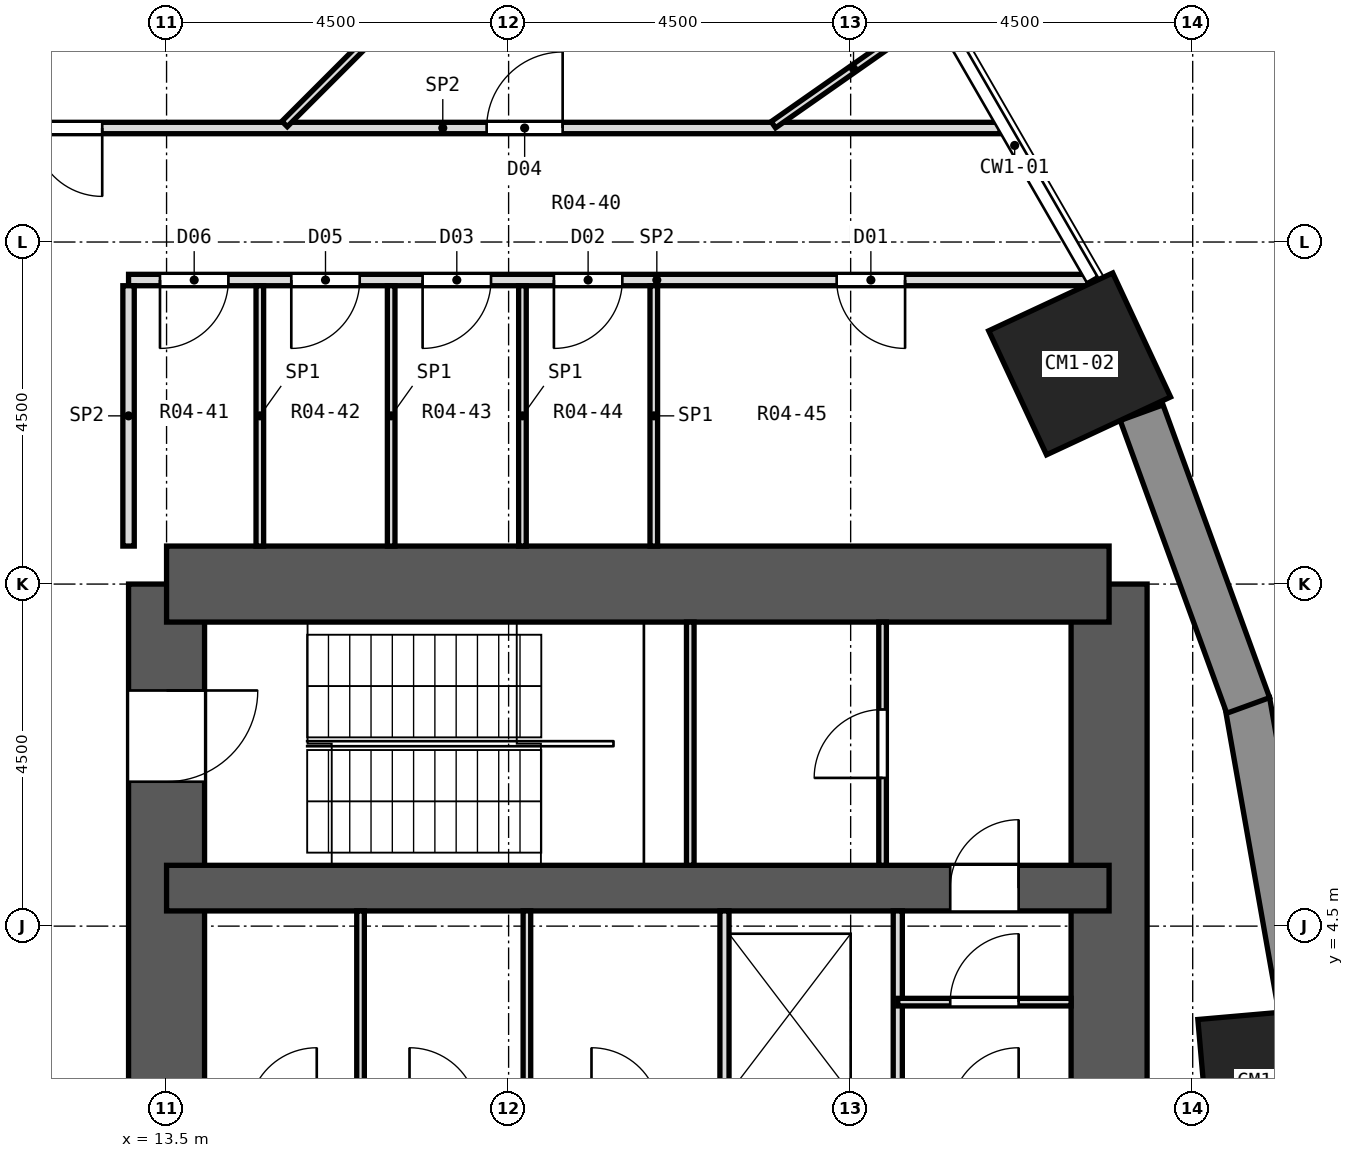
"""IFC4 building model, lengths in metres.
Left out: names, types, materials, properties, quantities, classifications, styles, units other than length and angle.
Written with IfcOpenShell. Run it as: python <this file> out.ifc"""

import sys

from ifc_helpers import new_model, si_unit, direction, frame, frame_2d, origin, origin_2d, place, context, subcontext, project, spatial, rectangle, extrude, element, fill, save


model = new_model("IFC4")
c1 = context("Model", 3, precision=1e-05, world=origin(), true_north=direction((0.0, 1.0)))
c2 = subcontext(c1, "Body", "Model", "MODEL_VIEW")
j1 = project(units=[si_unit("LENGTHUNIT", "METRE"), si_unit("PLANEANGLEUNIT", "RADIAN")], contexts=[c1])
p1 = place(None, origin())
s1 = spatial("IfcSite", under=j1, at=p1, CompositionType="ELEMENT")
p2 = place(p1, origin())
s2 = spatial("IfcBuilding", under=s1, at=p2, CompositionType="ELEMENT")
p3 = place(p2, frame((0.0, 0.0, 5.0)))
s3 = spatial("IfcBuildingStorey", under=s2, at=p3, CompositionType="ELEMENT", Elevation=5.0)
for number, where, z_axis, x_axis in (
    (1, (28.043, 2.453, 0.0), (0.0, 0.0, 1.0), (0.996, 0.087, 0.0)),
    (2, (25.512, 11.897, 0.0), (0.0, 0.0, 1.0), (0.906, 0.423, 0.0)),
):
    element("IfcColumn", number, at=place(p3, frame(where, z_axis=z_axis, x_axis=x_axis)), inside=s3, PredefinedType="COLUMN", context=c2, shape_type="SweptSolid", body=[
        extrude(rectangle(XDim=1.8, YDim=1.8, at=origin_2d()), origin(), (0.0, 0.0, 1.0), 4.2),
    ])
p4 = place(p3, frame((13.5, -9.0, 0.0), z_axis=(0.0, 0.0, 1.0), x_axis=(0.0, 1.0, 0.0)))
e3 = element("IfcWall", 3, at=p4, inside=s3, PredefinedType="SHEAR", context=c2, shape_type="SweptSolid", body=[
    extrude(rectangle(XDim=18.0, YDim=1.0, at=frame_2d((9.0, 0.0))), origin(), (0.0, 0.0, 1.0), 4.2),
])
p5 = place(p4, frame((15.4, 0.0, 0.0)))
e4 = element("IfcOpeningElement", 4, at=p5, cuts=e3, PredefinedType="OPENING", context=c2, shape_type="SweptSolid", body=[
    extrude(rectangle(XDim=1.2, YDim=2.1, at=frame_2d((0.6, 1.05))), frame((0.0, 0.512, 0.0), z_axis=(0.0, -1.0, 0.0), x_axis=(1.0, 0.0, 0.0)), (0.0, 0.0, 1.0), 1.024),
])
p6 = place(p4, frame((1.4, 0.0, 0.0)))
e5 = element("IfcOpeningElement", 5, at=p6, cuts=e3, PredefinedType="OPENING", context=c2, shape_type="SweptSolid", body=[
    extrude(rectangle(XDim=1.2, YDim=2.1, at=frame_2d((0.6, 1.05))), frame((0.0, 0.512, 0.0), z_axis=(0.0, -1.0, 0.0), x_axis=(1.0, 0.0, 0.0)), (0.0, 0.0, 1.0), 1.024),
])
p7 = place(p4, frame((7.5, 0.0, 0.0)))
e6 = element("IfcOpeningElement", 6, at=p7, cuts=e3, PredefinedType="OPENING", context=c2, shape_type="SweptSolid", body=[
    extrude(rectangle(XDim=3.0, YDim=2.4, at=frame_2d((1.5, 1.2))), frame((0.0, 0.512, 0.0), z_axis=(0.0, -1.0, 0.0), x_axis=(1.0, 0.0, 0.0)), (0.0, 0.0, 1.0), 1.024),
])
p8 = place(p3, frame((25.9, -9.0, 0.0), z_axis=(0.0, 0.0, 1.0), x_axis=(0.0, 1.0, 0.0)))
e7 = element("IfcWall", 7, at=p8, inside=s3, PredefinedType="SHEAR", context=c2, shape_type="SweptSolid", body=[
    extrude(rectangle(XDim=18.0, YDim=1.0, at=frame_2d((9.0, 0.0))), origin(), (0.0, 0.0, 1.0), 4.2),
])
p9 = place(p3, frame((13.5, 9.0, 0.0), z_axis=(0.0, 0.0, 1.0), x_axis=(1.0, 0.0, 0.0)))
e8 = element("IfcWall", 8, at=p9, inside=s3, PredefinedType="SHEAR", context=c2, shape_type="SweptSolid", body=[
    extrude(rectangle(XDim=12.4, YDim=1.0, at=frame_2d((6.2, 0.0))), origin(), (0.0, 0.0, 1.0), 4.2),
])
p10 = place(p3, frame((13.5, 5.0, 0.0), z_axis=(0.0, 0.0, 1.0), x_axis=(1.0, 0.0, 0.0)))
e9 = element("IfcWall", 9, at=p10, inside=s3, PredefinedType="SHEAR", context=c2, shape_type="SweptSolid", body=[
    extrude(rectangle(XDim=12.4, YDim=0.6, at=frame_2d((6.2, 0.0))), origin(), (0.0, 0.0, 1.0), 4.2),
])
p11 = place(p10, frame((10.31, 0.0, 0.0)))
e10 = element("IfcOpeningElement", 10, at=p11, cuts=e9, PredefinedType="OPENING", context=c2, shape_type="SweptSolid", body=[
    extrude(rectangle(XDim=0.9, YDim=2.1, at=frame_2d((0.45, 1.05))), frame((0.0, 0.312, 0.0), z_axis=(0.0, -1.0, 0.0), x_axis=(1.0, 0.0, 0.0)), (0.0, 0.0, 1.0), 0.624),
])
p12 = place(p3, frame((28.428, 3.417, 0.0), z_axis=(0.0, 0.0, 1.0), x_axis=(-0.173673210505, 0.984803338719, 0.0)))
e11 = element("IfcWall", 11, at=p12, inside=s3, PredefinedType="SOLIDWALL", context=c2, shape_type="SweptSolid", body=[
    extrude(rectangle(XDim=4.099, YDim=0.6, at=frame_2d((2.05, 0.0))), origin(), (0.0, 0.0, 1.0), 3.65),
])
p13 = place(p3, frame((27.73, 7.403, 0.0), z_axis=(0.0, 0.0, 1.0), x_axis=(-0.342034744565, 0.939687306241, 0.0)))
e12 = element("IfcWall", 12, at=p13, inside=s3, PredefinedType="SOLIDWALL", context=c2, shape_type="SweptSolid", body=[
    extrude(rectangle(XDim=4.099, YDim=0.6, at=frame_2d((2.05, 0.0))), origin(), (0.0, 0.0, 1.0), 3.65),
])
p14 = place(p3, frame((13.0, 13.0, 0.0), z_axis=(0.0, 0.0, 1.0), x_axis=(1.0, 0.0, 0.0)))
e13 = element("IfcWall", 13, at=p14, inside=s3, PredefinedType="PARTITIONING", context=c2, shape_type="SweptSolid", body=[
    extrude(rectangle(XDim=12.622, YDim=0.15, at=frame_2d((6.311, 0.0))), origin(), (0.0, 0.0, 1.0), 3.65),
])
p15 = place(p14, frame((9.316, 0.0, 0.0)))
e14 = element("IfcOpeningElement", 14, at=p15, cuts=e13, PredefinedType="OPENING", context=c2, shape_type="SweptSolid", body=[
    extrude(rectangle(XDim=0.9, YDim=2.1, at=frame_2d((0.45, 1.05))), frame((0.0, 0.087, 0.0), z_axis=(0.0, -1.0, 0.0), x_axis=(1.0, 0.0, 0.0)), (0.0, 0.0, 1.0), 0.174),
])
p16 = place(p14, frame((5.596, 0.0, 0.0)))
e15 = element("IfcOpeningElement", 15, at=p16, cuts=e13, PredefinedType="OPENING", context=c2, shape_type="SweptSolid", body=[
    extrude(rectangle(XDim=0.9, YDim=2.1, at=frame_2d((0.45, 1.05))), frame((0.0, 0.087, 0.0), z_axis=(0.0, -1.0, 0.0), x_axis=(1.0, 0.0, 0.0)), (0.0, 0.0, 1.0), 0.174),
])
p17 = place(p14, frame((3.868, 0.0, 0.0)))
e16 = element("IfcOpeningElement", 16, at=p17, cuts=e13, PredefinedType="OPENING", context=c2, shape_type="SweptSolid", body=[
    extrude(rectangle(XDim=0.9, YDim=2.1, at=frame_2d((0.45, 1.05))), frame((0.0, 0.087, 0.0), z_axis=(0.0, -1.0, 0.0), x_axis=(1.0, 0.0, 0.0)), (0.0, 0.0, 1.0), 0.174),
])
p18 = place(p14, frame((2.141, 0.0, 0.0)))
e17 = element("IfcOpeningElement", 17, at=p18, cuts=e13, PredefinedType="OPENING", context=c2, shape_type="SweptSolid", body=[
    extrude(rectangle(XDim=0.9, YDim=2.1, at=frame_2d((0.45, 1.05))), frame((0.0, 0.087, 0.0), z_axis=(0.0, -1.0, 0.0), x_axis=(1.0, 0.0, 0.0)), (0.0, 0.0, 1.0), 0.174),
])
p19 = place(p14, frame((0.414, 0.0, 0.0)))
e18 = element("IfcOpeningElement", 18, at=p19, cuts=e13, PredefinedType="OPENING", context=c2, shape_type="SweptSolid", body=[
    extrude(rectangle(XDim=0.9, YDim=2.1, at=frame_2d((0.45, 1.05))), frame((0.0, 0.087, 0.0), z_axis=(0.0, -1.0, 0.0), x_axis=(1.0, 0.0, 0.0)), (0.0, 0.0, 1.0), 0.174),
])
p20 = place(p3, frame((9.8, 15.0, 0.0), z_axis=(0.0, 0.0, 1.0), x_axis=(1.0, 0.0, 0.0)))
e19 = element("IfcWall", 19, at=p20, inside=s3, PredefinedType="PARTITIONING", context=c2, shape_type="SweptSolid", body=[
    extrude(rectangle(XDim=14.668, YDim=0.15, at=frame_2d((7.334, 0.0))), origin(), (0.0, 0.0, 1.0), 3.65),
])
p21 = place(p20, frame((7.911, 0.0, 0.0)))
e20 = element("IfcOpeningElement", 20, at=p21, cuts=e19, PredefinedType="OPENING", context=c2, shape_type="SweptSolid", body=[
    extrude(rectangle(XDim=1.0, YDim=2.1, at=frame_2d((0.5, 1.05))), frame((0.0, 0.087, 0.0), z_axis=(0.0, -1.0, 0.0), x_axis=(1.0, 0.0, 0.0)), (0.0, 0.0, 1.0), 0.174),
])
p22 = place(p20, frame((1.053, 0.0, 0.0)))
e21 = element("IfcOpeningElement", 21, at=p22, cuts=e19, PredefinedType="OPENING", context=c2, shape_type="SweptSolid", body=[
    extrude(rectangle(XDim=1.8, YDim=2.1, at=frame_2d((0.9, 1.05))), frame((0.0, 0.087, 0.0), z_axis=(0.0, -1.0, 0.0), x_axis=(1.0, 0.0, 0.0)), (0.0, 0.0, 1.0), 0.174),
])
p23 = place(p3, frame((21.483, 15.043, 0.0), z_axis=(0.0, 0.0, 1.0), x_axis=(0.819102633098, 0.573646996376, 0.0)))
e22 = element("IfcWall", 22, at=p23, inside=s3, PredefinedType="PARTITIONING", context=c2, shape_type="SweptSolid", body=[
    extrude(rectangle(XDim=2.573, YDim=0.1, at=frame_2d((1.287, 0.0))), origin(), (0.0, 0.0, 1.0), 3.65),
])
p24 = place(p3, frame((15.053, 15.053, 0.0), z_axis=(0.0, 0.0, 1.0), x_axis=(0.707106781187, 0.707106781187, 0.0)))
e23 = element("IfcWall", 23, at=p24, inside=s3, PredefinedType="PARTITIONING", context=c2, shape_type="SweptSolid", body=[
    extrude(rectangle(XDim=5.952, YDim=0.1, at=frame_2d((2.976, 0.0))), origin(), (0.0, 0.0, 1.0), 3.65),
])
p25 = place(p3, frame((10.546, 15.061, 0.0), z_axis=(0.0, 0.0, 1.0), x_axis=(0.573610244327, 0.819128370649, 0.0)))
e24 = element("IfcWall", 24, at=p25, inside=s3, PredefinedType="PARTITIONING", context=c2, shape_type="SweptSolid", body=[
    extrude(rectangle(XDim=10.413, YDim=0.1, at=frame_2d((5.207, 0.0))), origin(), (0.0, 0.0, 1.0), 3.65),
])
p26 = place(p25, frame((4.669, 0.0, 0.0)))
e25 = element("IfcOpeningElement", 25, at=p26, cuts=e24, PredefinedType="OPENING", context=c2, shape_type="SweptSolid", body=[
    extrude(rectangle(XDim=1.0, YDim=2.1, at=frame_2d((0.5, 1.05))), frame((0.0, 0.062, 0.0), z_axis=(0.0, -1.0, 0.0), x_axis=(1.0, 0.0, 0.0)), (0.0, 0.0, 1.0), 0.124),
])
for number, where, z_axis, x_axis in (
    (26, (19.91, 9.5, 0.0), (0.0, 0.0, 1.0), (0.0, 1.0, 0.0)),
    (27, (18.182, 9.5, 0.0), (0.0, 0.0, 1.0), (0.0, 1.0, 0.0)),
    (28, (16.455, 9.5, 0.0), (0.0, 0.0, 1.0), (0.0, 1.0, 0.0)),
    (29, (14.727, 9.5, 0.0), (0.0, 0.0, 1.0), (0.0, 1.0, 0.0)),
):
    element("IfcWall", number, at=place(p3, frame(where, z_axis=z_axis, x_axis=x_axis)), inside=s3, PredefinedType="PARTITIONING", context=c2, shape_type="SweptSolid", body=[
        extrude(rectangle(XDim=3.425, YDim=0.1, at=frame_2d((1.712, 0.0))), origin(), (0.0, 0.0, 1.0), 3.65),
    ])
p27 = place(p3, frame((13.0, 9.5, 0.0), z_axis=(0.0, 0.0, 1.0), x_axis=(0.0, 1.0, 0.0)))
e30 = element("IfcWall", 30, at=p27, inside=s3, PredefinedType="PARTITIONING", context=c2, shape_type="SweptSolid", body=[
    extrude(rectangle(XDim=3.425, YDim=0.15, at=frame_2d((1.712, 0.0))), origin(), (0.0, 0.0, 1.0), 3.65),
])
for number, where, z_axis, x_axis in (
    (31, (16.052, 2.3, 0.0), (0.0, 0.0, 1.0), (0.0, 1.0, 0.0)),
    (32, (18.241, 2.3, 0.0), (0.0, 0.0, 1.0), (0.0, 1.0, 0.0)),
):
    element("IfcWall", number, at=place(p3, frame(where, z_axis=z_axis, x_axis=x_axis)), inside=s3, PredefinedType="PARTITIONING", context=c2, shape_type="SweptSolid", body=[
        extrude(rectangle(XDim=2.4, YDim=0.1, at=frame_2d((1.2, 0.0))), origin(), (0.0, 0.0, 1.0), 3.65),
    ])
for number, where, z_axis, x_axis in (
    (33, (20.84, 2.3, 0.0), (0.0, 0.0, 1.0), (0.0, 1.0, 0.0)),
    (34, (23.12, 2.3, 0.0), (0.0, 0.0, 1.0), (0.0, 1.0, 0.0)),
):
    element("IfcWall", number, at=place(p3, frame(where, z_axis=z_axis, x_axis=x_axis)), inside=s3, PredefinedType="PARTITIONING", context=c2, shape_type="SweptSolid", body=[
        extrude(rectangle(XDim=2.4, YDim=0.12, at=frame_2d((1.2, 0.0))), origin(), (0.0, 0.0, 1.0), 3.65),
    ])
p28 = place(p3, frame((23.12, 3.5, 0.0), z_axis=(0.0, 0.0, 1.0), x_axis=(1.0, 0.0, 0.0)))
e35 = element("IfcWall", 35, at=p28, inside=s3, PredefinedType="PARTITIONING", context=c2, shape_type="SweptSolid", body=[
    extrude(rectangle(XDim=2.28, YDim=0.1, at=frame_2d((1.14, 0.0))), origin(), (0.0, 0.0, 1.0), 3.65),
])
p29 = place(p28, frame((0.69, 0.0, 0.0)))
e36 = element("IfcOpeningElement", 36, at=p29, cuts=e35, PredefinedType="OPENING", context=c2, shape_type="SweptSolid", body=[
    extrude(rectangle(XDim=0.9, YDim=2.1, at=frame_2d((0.45, 1.05))), frame((0.0, 0.062, 0.0), z_axis=(0.0, -1.0, 0.0), x_axis=(1.0, 0.0, 0.0)), (0.0, 0.0, 1.0), 0.124),
])
p30 = place(p3, frame((20.39, 5.3, 0.0), z_axis=(0.0, 0.0, 1.0), x_axis=(0.0, 1.0, 0.0)))
e37 = element("IfcWall", 37, at=p30, inside=s3, PredefinedType="PARTITIONING", context=c2, shape_type="SweptSolid", body=[
    extrude(rectangle(XDim=3.2, YDim=0.1, at=frame_2d((1.6, 0.0))), origin(), (0.0, 0.0, 1.0), 3.65),
])
p31 = place(p3, frame((22.92, 5.3, 0.0), z_axis=(0.0, 0.0, 1.0), x_axis=(0.0, 1.0, 0.0)))
e38 = element("IfcWall", 38, at=p31, inside=s3, PredefinedType="PARTITIONING", context=c2, shape_type="SweptSolid", body=[
    extrude(rectangle(XDim=3.2, YDim=0.1, at=frame_2d((1.6, 0.0))), origin(), (0.0, 0.0, 1.0), 3.65),
])
p32 = place(p31, frame((1.15, 0.0, 0.0)))
e39 = element("IfcOpeningElement", 39, at=p32, cuts=e38, PredefinedType="OPENING", context=c2, shape_type="SweptSolid", body=[
    extrude(rectangle(XDim=0.9, YDim=2.1, at=frame_2d((0.45, 1.05))), frame((0.0, 0.062, 0.0), z_axis=(0.0, -1.0, 0.0), x_axis=(1.0, 0.0, 0.0)), (0.0, 0.0, 1.0), 0.124),
])
p33 = place(p15, frame((0.9, 0.0, 0.0), z_axis=(0.0, 0.0, 1.0), x_axis=(-1.0, 0.0, 0.0)))
e40 = element("IfcDoor", 40, at=p33, inside=s3, OperationType="SINGLE_SWING_LEFT", PredefinedType="DOOR", context=c2, shape_type="SweptSolid", body=[
    extrude(rectangle(XDim=0.9, YDim=2.1, at=frame_2d((0.45, 1.05))), frame((0.0, 0.025, 0.0), z_axis=(0.0, -1.0, 0.0), x_axis=(1.0, 0.0, 0.0)), (0.0, 0.0, 1.0), 0.05),
])
fill(e14, e40)
p34 = place(p16, frame((0.9, 0.0, 0.0), z_axis=(0.0, 0.0, 1.0), x_axis=(-1.0, 0.0, 0.0)))
e41 = element("IfcDoor", 41, at=p34, inside=s3, OperationType="SINGLE_SWING_RIGHT", PredefinedType="DOOR", context=c2, shape_type="SweptSolid", body=[
    extrude(rectangle(XDim=0.9, YDim=2.1, at=frame_2d((0.45, 1.05))), frame((0.0, 0.025, 0.0), z_axis=(0.0, -1.0, 0.0), x_axis=(1.0, 0.0, 0.0)), (0.0, 0.0, 1.0), 0.05),
])
fill(e15, e41)
p35 = place(p17, frame((0.9, 0.0, 0.0), z_axis=(0.0, 0.0, 1.0), x_axis=(-1.0, 0.0, 0.0)))
e42 = element("IfcDoor", 42, at=p35, inside=s3, OperationType="SINGLE_SWING_RIGHT", PredefinedType="DOOR", context=c2, shape_type="SweptSolid", body=[
    extrude(rectangle(XDim=0.9, YDim=2.1, at=frame_2d((0.45, 1.05))), frame((0.0, 0.025, 0.0), z_axis=(0.0, -1.0, 0.0), x_axis=(1.0, 0.0, 0.0)), (0.0, 0.0, 1.0), 0.05),
])
fill(e16, e42)
p36 = place(p21, origin())
e43 = element("IfcDoor", 43, at=p36, inside=s3, OperationType="SINGLE_SWING_RIGHT", PredefinedType="DOOR", context=c2, shape_type="SweptSolid", body=[
    extrude(rectangle(XDim=1.0, YDim=2.1, at=frame_2d((0.5, 1.05))), frame((0.0, 0.025, 0.0), z_axis=(0.0, -1.0, 0.0), x_axis=(1.0, 0.0, 0.0)), (0.0, 0.0, 1.0), 0.05),
])
fill(e20, e43)
p37 = place(p18, frame((0.9, 0.0, 0.0), z_axis=(0.0, 0.0, 1.0), x_axis=(-1.0, 0.0, 0.0)))
e44 = element("IfcDoor", 44, at=p37, inside=s3, OperationType="SINGLE_SWING_RIGHT", PredefinedType="DOOR", context=c2, shape_type="SweptSolid", body=[
    extrude(rectangle(XDim=0.9, YDim=2.1, at=frame_2d((0.45, 1.05))), frame((0.0, 0.025, 0.0), z_axis=(0.0, -1.0, 0.0), x_axis=(1.0, 0.0, 0.0)), (0.0, 0.0, 1.0), 0.05),
])
fill(e17, e44)
p38 = place(p19, frame((0.9, 0.0, 0.0), z_axis=(0.0, 0.0, 1.0), x_axis=(-1.0, 0.0, 0.0)))
e45 = element("IfcDoor", 45, at=p38, inside=s3, OperationType="SINGLE_SWING_RIGHT", PredefinedType="DOOR", context=c2, shape_type="SweptSolid", body=[
    extrude(rectangle(XDim=0.9, YDim=2.1, at=frame_2d((0.45, 1.05))), frame((0.0, 0.025, 0.0), z_axis=(0.0, -1.0, 0.0), x_axis=(1.0, 0.0, 0.0)), (0.0, 0.0, 1.0), 0.05),
])
fill(e18, e45)
p39 = place(p22, frame((1.8, 0.0, 0.0), z_axis=(0.0, 0.0, 1.0), x_axis=(-1.0, 0.0, 0.0)))
e46 = element("IfcDoor", 46, at=p39, inside=s3, OperationType="DOUBLE_DOOR_SINGLE_SWING", PredefinedType="DOOR", context=c2, shape_type="SweptSolid", body=[
    extrude(rectangle(XDim=1.8, YDim=2.1, at=frame_2d((0.9, 1.05))), frame((0.0, 0.025, 0.0), z_axis=(0.0, -1.0, 0.0), x_axis=(1.0, 0.0, 0.0)), (0.0, 0.0, 1.0), 0.05),
])
fill(e21, e46)
p40 = place(p29, origin())
e47 = element("IfcDoor", 47, at=p40, inside=s3, OperationType="SINGLE_SWING_RIGHT", PredefinedType="DOOR", context=c2, shape_type="SweptSolid", body=[
    extrude(rectangle(XDim=0.9, YDim=2.1, at=frame_2d((0.45, 1.05))), frame((0.0, 0.025, 0.0), z_axis=(0.0, -1.0, 0.0), x_axis=(1.0, 0.0, 0.0)), (0.0, 0.0, 1.0), 0.05),
])
fill(e36, e47)
p41 = place(p32, origin())
e48 = element("IfcDoor", 48, at=p41, inside=s3, OperationType="SINGLE_SWING_LEFT", PredefinedType="DOOR", context=c2, shape_type="SweptSolid", body=[
    extrude(rectangle(XDim=0.9, YDim=2.1, at=frame_2d((0.45, 1.05))), frame((0.0, 0.025, 0.0), z_axis=(0.0, -1.0, 0.0), x_axis=(1.0, 0.0, 0.0)), (0.0, 0.0, 1.0), 0.05),
])
fill(e39, e48)
p42 = place(p11, origin())
e49 = element("IfcDoor", 49, at=p42, inside=s3, OperationType="SINGLE_SWING_RIGHT", PredefinedType="DOOR", context=c2, shape_type="SweptSolid", body=[
    extrude(rectangle(XDim=0.9, YDim=2.1, at=frame_2d((0.45, 1.05))), frame((0.0, 0.025, 0.0), z_axis=(0.0, -1.0, 0.0), x_axis=(1.0, 0.0, 0.0)), (0.0, 0.0, 1.0), 0.05),
])
fill(e10, e49)
p43 = place(p5, frame((1.2, 0.0, 0.0), z_axis=(0.0, 0.0, 1.0), x_axis=(-1.0, 0.0, 0.0)))
e50 = element("IfcDoor", 50, at=p43, inside=s3, OperationType="SINGLE_SWING_LEFT", PredefinedType="DOOR", context=c2, shape_type="SweptSolid", body=[
    extrude(rectangle(XDim=1.2, YDim=2.1, at=frame_2d((0.6, 1.05))), frame((0.0, 0.025, 0.0), z_axis=(0.0, -1.0, 0.0), x_axis=(1.0, 0.0, 0.0)), (0.0, 0.0, 1.0), 0.05),
])
fill(e4, e50)
save(model, sys.argv[1])
